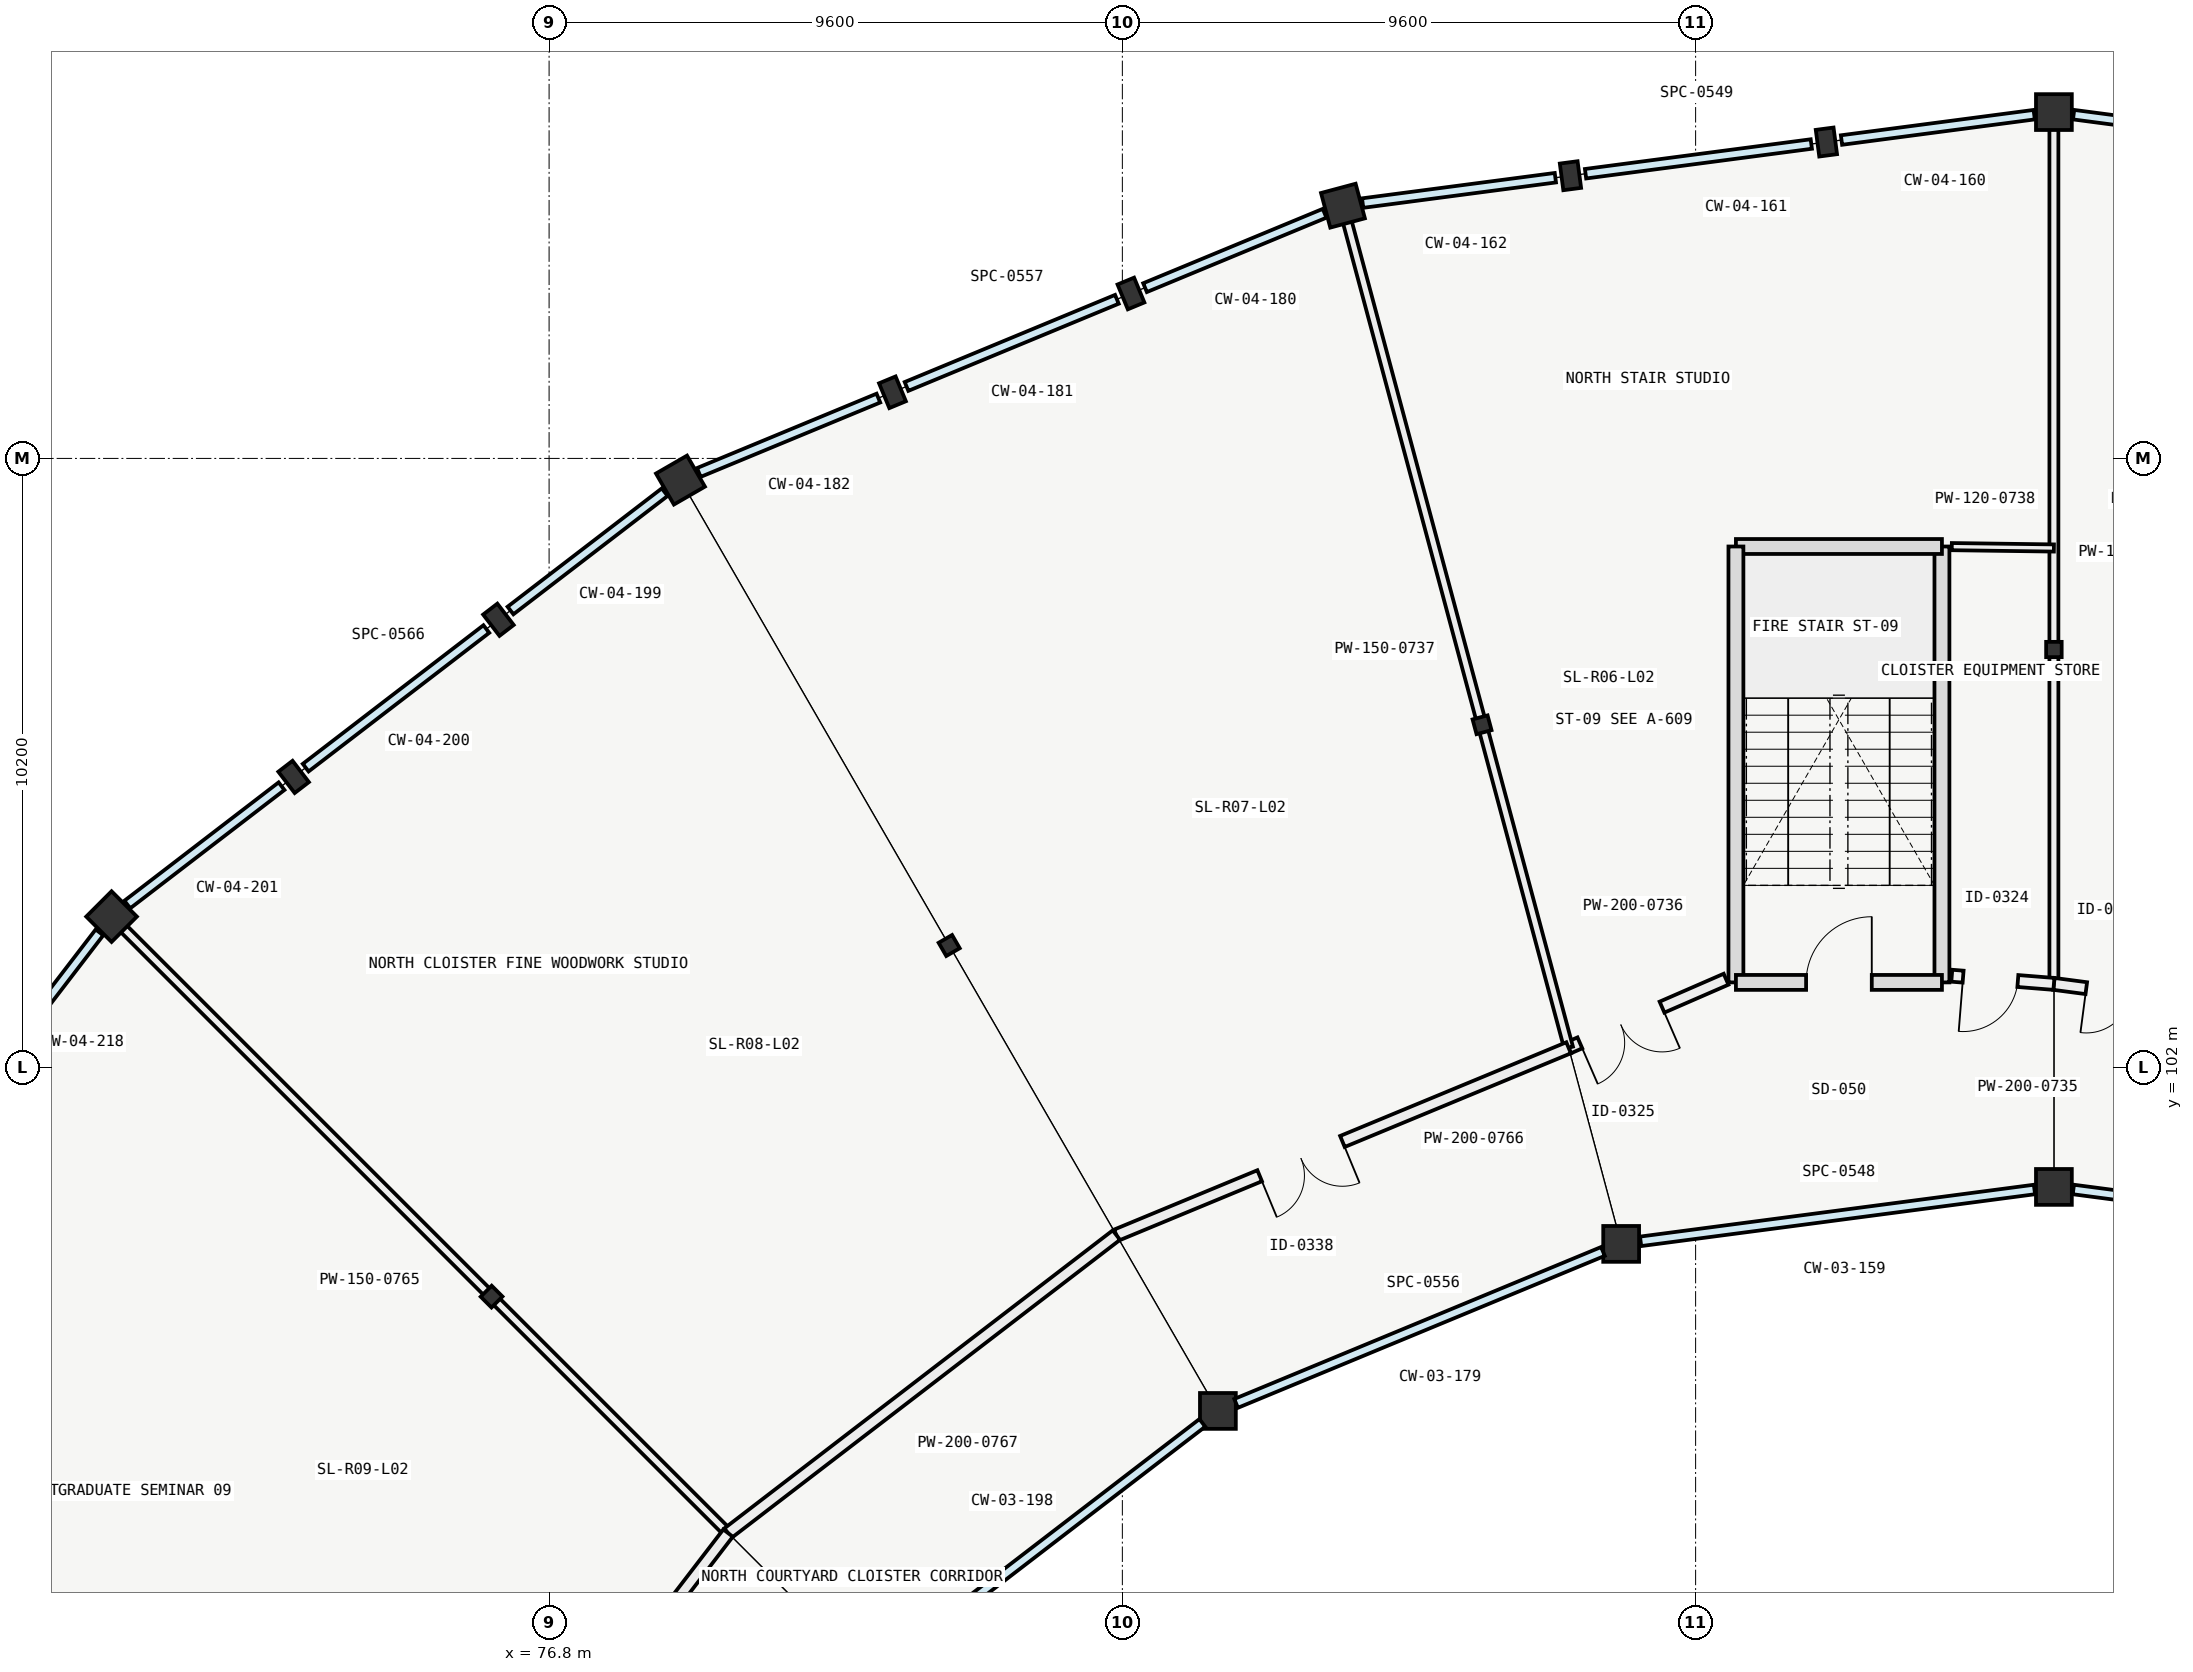
"""IFC4 building model, lengths in metres.
Left out: names, types, materials, properties, quantities, classifications, styles, units other than length and angle.
Written with IfcOpenShell. Run it as: python <this file> out.ifc"""

import sys

from ifc_helpers import new_model, si_unit, direction, frame, frame_2d, origin, origin_2d, place, context, subcontext, project, spatial, rectangle, circle, i_section, extrude, element, fill, save


model = new_model("IFC4")
c1 = context("Model", 3, precision=1e-05, world=origin(), true_north=direction((0.0, 1.0)))
c2 = subcontext(c1, "Body", "Model", "MODEL_VIEW")
j1 = project(units=[si_unit("LENGTHUNIT", "METRE"), si_unit("PLANEANGLEUNIT", "RADIAN")], contexts=[c1])
p1 = place(None, origin())
s1 = spatial("IfcSite", under=j1, at=p1, CompositionType="ELEMENT")
p2 = place(p1, origin())
s2 = spatial("IfcBuilding", under=s1, at=p2, CompositionType="ELEMENT")
p3 = place(p2, frame((0.0, 0.0, 9.6)))
s3 = spatial("IfcBuildingStorey", under=s2, at=p3, CompositionType="ELEMENT", Elevation=9.6)
p4 = place(p3, frame((102.0, 100.0, 0.0), z_axis=(0.0, 0.0, 1.0), x_axis=(0.0, 1.0, 0.0)))
e1 = element("IfcColumn", 1, at=p4, inside=s3, PredefinedType="COLUMN", context=c2, shape_type="SweptSolid", body=[
    extrude(circle(Radius=0.3, at=origin_2d()), origin(), (0.0, 0.0, 1.0), 4.2),
])
p5 = place(p3, frame((102.0, 109.0, 0.0), z_axis=(0.0, 0.0, 1.0), x_axis=(0.0, 1.0, 0.0)))
e2 = element("IfcColumn", 2, at=p5, inside=s3, PredefinedType="COLUMN", context=c2, shape_type="SweptSolid", body=[
    extrude(i_section(OverallWidth=0.256, OverallDepth=0.26, WebThickness=0.01, FlangeThickness=0.017, FilletRadius=0.014, at=origin_2d()), origin(), (0.0, 0.0, 1.0), 4.2),
])
p6 = place(p3, frame((102.0, 118.0, 0.0), z_axis=(0.0, 0.0, 1.0), x_axis=(0.0, 1.0, 0.0)))
e3 = element("IfcColumn", 3, at=p6, inside=s3, PredefinedType="COLUMN", context=c2, shape_type="SweptSolid", body=[
    extrude(rectangle(XDim=0.6, YDim=0.6, at=origin_2d()), origin(), (0.0, 0.0, 1.0), 4.2),
])
p7 = place(p3, frame((94.753, 99.046, 0.0), z_axis=(0.0, 0.0, 1.0), x_axis=(-0.258819045103, 0.965925826289, 0.0)))
e4 = element("IfcColumn", 4, at=p7, inside=s3, PredefinedType="COLUMN", context=c2, shape_type="SweptSolid", body=[
    extrude(circle(Radius=0.3, at=origin_2d()), origin(), (0.0, 0.0, 1.0), 4.2),
])
p8 = place(p3, frame((92.424, 107.739, 0.0), z_axis=(0.0, 0.0, 1.0), x_axis=(-0.258819045103, 0.965925826289, 0.0)))
e5 = element("IfcColumn", 5, at=p8, inside=s3, PredefinedType="COLUMN", context=c2, shape_type="SweptSolid", body=[
    extrude(i_section(OverallWidth=0.256, OverallDepth=0.26, WebThickness=0.01, FlangeThickness=0.017, FilletRadius=0.014, at=origin_2d()), origin(), (0.0, 0.0, 1.0), 4.2),
])
p9 = place(p3, frame((90.094, 116.433, 0.0), z_axis=(0.0, 0.0, 1.0), x_axis=(-0.258819045103, 0.965925826289, 0.0)))
e6 = element("IfcColumn", 6, at=p9, inside=s3, PredefinedType="COLUMN", context=c2, shape_type="SweptSolid", body=[
    extrude(rectangle(XDim=0.6, YDim=0.6, at=origin_2d()), origin(), (0.0, 0.0, 1.0), 4.2),
])
p10 = place(p3, frame((88.0, 96.249, 0.0), z_axis=(0.0, 0.0, 1.0), x_axis=(-0.5, 0.866025403784, 0.0)))
e7 = element("IfcColumn", 7, at=p10, inside=s3, PredefinedType="COLUMN", context=c2, shape_type="SweptSolid", body=[
    extrude(circle(Radius=0.3, at=origin_2d()), origin(), (0.0, 0.0, 1.0), 4.2),
])
p11 = place(p3, frame((83.5, 104.043, 0.0), z_axis=(0.0, 0.0, 1.0), x_axis=(-0.5, 0.866025403784, 0.0)))
e8 = element("IfcColumn", 8, at=p11, inside=s3, PredefinedType="COLUMN", context=c2, shape_type="SweptSolid", body=[
    extrude(i_section(OverallWidth=0.256, OverallDepth=0.26, WebThickness=0.01, FlangeThickness=0.017, FilletRadius=0.014, at=origin_2d()), origin(), (0.0, 0.0, 1.0), 4.2),
])
p12 = place(p3, frame((79.0, 111.837, 0.0), z_axis=(0.0, 0.0, 1.0), x_axis=(-0.5, 0.866025403784, 0.0)))
e9 = element("IfcColumn", 9, at=p12, inside=s3, PredefinedType="COLUMN", context=c2, shape_type="SweptSolid", body=[
    extrude(rectangle(XDim=0.6, YDim=0.6, at=origin_2d()), origin(), (0.0, 0.0, 1.0), 4.2),
])
p13 = place(p3, frame((75.837, 98.163, 0.0), z_axis=(0.0, 0.0, 1.0), x_axis=(-0.707106781187, 0.707106781187, 0.0)))
e10 = element("IfcColumn", 10, at=p13, inside=s3, PredefinedType="COLUMN", context=c2, shape_type="SweptSolid", body=[
    extrude(i_section(OverallWidth=0.256, OverallDepth=0.26, WebThickness=0.01, FlangeThickness=0.017, FilletRadius=0.014, at=origin_2d()), origin(), (0.0, 0.0, 1.0), 4.2),
])
p14 = place(p3, frame((69.473, 104.527, 0.0), z_axis=(0.0, 0.0, 1.0), x_axis=(-0.707106781187, 0.707106781187, 0.0)))
e11 = element("IfcColumn", 11, at=p14, inside=s3, PredefinedType="COLUMN", context=c2, shape_type="SweptSolid", body=[
    extrude(rectangle(XDim=0.6, YDim=0.6, at=origin_2d()), origin(), (0.0, 0.0, 1.0), 4.2),
])
for number, where, z_axis, x_axis in (
    (12, (98.19, 117.498, 0.0), (0.0, 0.0, 1.0), (0.991, 0.131, 0.0)),
    (13, (93.904, 116.934, 0.0), (0.0, 0.0, 1.0), (0.991, 0.131, 0.0)),
    (14, (86.544, 114.962, 0.0), (0.0, 0.0, 1.0), (0.924, 0.383, 0.0)),
    (15, (82.55, 113.308, 0.0), (0.0, 0.0, 1.0), (0.924, 0.383, 0.0)),
    (16, (75.951, 109.498, 0.0), (0.0, 0.0, 1.0), (0.793, 0.609, 0.0)),
    (17, (72.522, 106.866, 0.0), (0.0, 0.0, 1.0), (0.793, 0.609, 0.0)),
):
    element("IfcColumn", number, at=place(p3, frame(where, z_axis=z_axis, x_axis=x_axis)), inside=s3, PredefinedType="PILASTER", context=c2, shape_type="SweptSolid", body=[
        extrude(rectangle(XDim=0.3, YDim=0.45, at=origin_2d()), origin(), (0.0, 0.0, 1.0), 4.2),
    ])
p15 = place(p3, frame((100.125, 103.425, 0.0), z_axis=(0.0, 0.0, 1.0), x_axis=(0.0, 1.0, 0.0)))
e18 = element("IfcWall", 18, at=p15, inside=s3, PredefinedType="SOLIDWALL", context=c2, shape_type="SweptSolid", body=[
    extrude(rectangle(XDim=7.3, YDim=0.25, at=frame_2d((3.65, 0.0))), origin(), (0.0, 0.0, 1.0), 3.95),
])
p16 = place(p3, frame((100.125, 110.725, 0.0), z_axis=(0.0, 0.0, 1.0), x_axis=(-1.0, 0.0, 0.0)))
e19 = element("IfcWall", 19, at=p16, inside=s3, PredefinedType="SOLIDWALL", context=c2, shape_type="SweptSolid", body=[
    extrude(rectangle(XDim=3.45, YDim=0.25, at=frame_2d((1.725, 0.0))), origin(), (0.0, 0.0, 1.0), 3.95),
])
p17 = place(p3, frame((96.675, 110.725, 0.0), z_axis=(0.0, 0.0, 1.0), x_axis=(0.0, -1.0, 0.0)))
e20 = element("IfcWall", 20, at=p17, inside=s3, PredefinedType="SOLIDWALL", context=c2, shape_type="SweptSolid", body=[
    extrude(rectangle(XDim=7.3, YDim=0.25, at=frame_2d((3.65, 0.0))), origin(), (0.0, 0.0, 1.0), 3.95),
])
p18 = place(p3, frame((96.675, 103.425, 0.0), z_axis=(0.0, 0.0, 1.0), x_axis=(1.0, 0.0, 0.0)))
e21 = element("IfcWall", 21, at=p18, inside=s3, PredefinedType="SOLIDWALL", context=c2, shape_type="SweptSolid", body=[
    extrude(rectangle(XDim=3.45, YDim=0.25, at=frame_2d((1.725, 0.0))), origin(), (0.0, 0.0, 1.0), 3.95),
])
p19 = place(p18, frame((1.175, 0.0, 0.0)))
e22 = element("IfcOpeningElement", 22, at=p19, cuts=e21, PredefinedType="OPENING", context=c2, shape_type="SweptSolid", body=[
    extrude(rectangle(XDim=1.1, YDim=2.2, at=frame_2d((0.55, 1.1))), frame((0.0, 0.135, 0.0), z_axis=(0.0, -1.0, 0.0), x_axis=(1.0, 0.0, 0.0)), (0.0, 0.0, 1.0), 0.27),
])
p20 = place(p3, frame((102.0, 103.4, 0.0), z_axis=(0.0, 0.0, 1.0), x_axis=(0.0, 1.0, 0.0)))
e23 = element("IfcWall", 23, at=p20, inside=s3, PredefinedType="PARTITIONING", context=c2, shape_type="SweptSolid", body=[
    extrude(rectangle(XDim=14.48, YDim=0.15, at=frame_2d((7.24, 0.0))), origin(), (0.0, 0.0, 1.0), 3.397),
])
p21 = place(p3, frame((110.127, 102.33, 0.0), z_axis=(0.0, 0.0, 1.0), x_axis=(-0.991446589332, 0.130513066404, 0.0)))
e24 = element("IfcWall", 24, at=p21, inside=s3, PredefinedType="PARTITIONING", context=c2, shape_type="SweptSolid", body=[
    extrude(rectangle(XDim=8.197, YDim=0.2, at=frame_2d((4.099, 0.0))), origin(), (0.0, 0.0, 1.0), 3.402),
])
p22 = place(p21, frame((2.05, 0.0, 0.0)))
e25 = element("IfcOpeningElement", 25, at=p22, cuts=e24, PredefinedType="OPENING", context=c2, shape_type="SweptSolid", body=[
    extrude(rectangle(XDim=0.9, YDim=2.05, at=frame_2d((0.45, 1.025))), frame((0.0, 0.11, 0.0), z_axis=(0.0, -1.0, 0.0), x_axis=(1.0, 0.0, 0.0)), (0.0, 0.0, 1.0), 0.22),
])
p23 = place(p21, frame((6.15, 0.0, 0.0)))
e26 = element("IfcOpeningElement", 26, at=p23, cuts=e24, PredefinedType="OPENING", context=c2, shape_type="SweptSolid", body=[
    extrude(rectangle(XDim=1.5, YDim=2.2, at=frame_2d((0.75, 1.1))), frame((0.0, 0.11, 0.0), z_axis=(0.0, -1.0, 0.0), x_axis=(1.0, 0.0, 0.0)), (0.0, 0.0, 1.0), 0.22),
])
p24 = place(p3, frame((102.0, 103.4, 0.0), z_axis=(0.0, 0.0, 1.0), x_axis=(-0.996807580938, 0.07984138391, 0.0)))
e27 = element("IfcWall", 27, at=p24, inside=s3, PredefinedType="PARTITIONING", context=c2, shape_type="SweptSolid", body=[
    extrude(rectangle(XDim=1.715, YDim=0.2, at=frame_2d((0.858, 0.0))), origin(), (0.0, 0.0, 1.0), 3.402),
])
p25 = place(p24, frame((0.605, 0.0, 0.0)))
e28 = element("IfcOpeningElement", 28, at=p25, cuts=e27, PredefinedType="OPENING", context=c2, shape_type="SweptSolid", body=[
    extrude(rectangle(XDim=0.92, YDim=2.1, at=frame_2d((0.46, 1.05))), frame((0.0, 0.11, 0.0), z_axis=(0.0, -1.0, 0.0), x_axis=(1.0, 0.0, 0.0)), (0.0, 0.0, 1.0), 0.22),
])
p26 = place(p3, frame((96.51, 103.478, 0.0), z_axis=(0.0, 0.0, 1.0), x_axis=(-0.916855346374, -0.399219580964, 0.0)))
e29 = element("IfcWall", 29, at=p26, inside=s3, PredefinedType="PARTITIONING", context=c2, shape_type="SweptSolid", body=[
    extrude(rectangle(XDim=2.876, YDim=0.2, at=frame_2d((1.438, 0.0))), origin(), (0.0, 0.0, 1.0), 3.402),
])
p27 = place(p26, frame((1.17, 0.0, 0.0)))
e30 = element("IfcOpeningElement", 30, at=p27, cuts=e29, PredefinedType="OPENING", context=c2, shape_type="SweptSolid", body=[
    extrude(rectangle(XDim=1.5, YDim=2.2, at=frame_2d((0.75, 1.1))), frame((0.0, 0.11, 0.0), z_axis=(0.0, -1.0, 0.0), x_axis=(1.0, 0.0, 0.0)), (0.0, 0.0, 1.0), 0.22),
])
p28 = place(p3, frame((93.873, 102.33, 0.0), z_axis=(0.0, 0.0, 1.0), x_axis=(-0.258810530041, 0.965928107853, 0.0)))
e31 = element("IfcWall", 31, at=p28, inside=s3, PredefinedType="PARTITIONING", context=c2, shape_type="SweptSolid", body=[
    extrude(rectangle(XDim=14.48, YDim=0.15, at=frame_2d((7.24, 0.0))), origin(), (0.0, 0.0, 1.0), 3.397),
])
p29 = place(p3, frame((100.29, 110.723, 0.0), z_axis=(0.0, 0.0, 1.0), x_axis=(0.999909951855, -0.013419693814, 0.0)))
e32 = element("IfcWall", 32, at=p29, inside=s3, PredefinedType="PARTITIONING", context=c2, shape_type="SweptSolid", body=[
    extrude(rectangle(XDim=1.71, YDim=0.12, at=frame_2d((0.855, 0.0))), origin(), (0.0, 0.0, 1.0), 3.397),
])
p30 = place(p3, frame((79.797, 94.203, 0.0), z_axis=(0.0, 0.0, 1.0), x_axis=(-0.707106781187, 0.707106781187, 0.0)))
e33 = element("IfcWall", 33, at=p30, inside=s3, PredefinedType="PARTITIONING", context=c2, shape_type="SweptSolid", body=[
    extrude(rectangle(XDim=14.48, YDim=0.15, at=frame_2d((7.24, 0.0))), origin(), (0.0, 0.0, 1.0), 3.397),
])
p31 = place(p3, frame((93.873, 102.33, 0.0), z_axis=(0.0, 0.0, 1.0), x_axis=(-0.923874167149, -0.382696385238, 0.0)))
e34 = element("IfcWall", 34, at=p31, inside=s3, PredefinedType="PARTITIONING", context=c2, shape_type="SweptSolid", body=[
    extrude(rectangle(XDim=8.197, YDim=0.2, at=frame_2d((4.099, 0.0))), origin(), (0.0, 0.0, 1.0), 3.402),
])
p32 = place(p31, frame((4.1, 0.0, 0.0)))
e35 = element("IfcOpeningElement", 35, at=p32, cuts=e34, PredefinedType="OPENING", context=c2, shape_type="SweptSolid", body=[
    extrude(rectangle(XDim=1.5, YDim=2.2, at=frame_2d((0.75, 1.1))), frame((0.0, 0.11, 0.0), z_axis=(0.0, -1.0, 0.0), x_axis=(1.0, 0.0, 0.0)), (0.0, 0.0, 1.0), 0.22),
])
p33 = place(p3, frame((86.3, 99.193, 0.0), z_axis=(0.0, 0.0, 1.0), x_axis=(-0.793357497113, -0.608756011694, 0.0)))
e36 = element("IfcWall", 36, at=p33, inside=s3, PredefinedType="PARTITIONING", context=c2, shape_type="SweptSolid", body=[
    extrude(rectangle(XDim=8.197, YDim=0.2, at=frame_2d((4.099, 0.0))), origin(), (0.0, 0.0, 1.0), 3.402),
])
p34 = place(p3, frame((74.807, 87.7, 0.0), z_axis=(0.0, 0.0, 1.0), x_axis=(-0.866025544155, 0.499999756871, 0.0)))
e37 = element("IfcWall", 37, at=p34, inside=s3, PredefinedType="PARTITIONING", context=c2, shape_type="SweptSolid", body=[
    extrude(rectangle(XDim=14.48, YDim=0.15, at=frame_2d((7.24, 0.0))), origin(), (0.0, 0.0, 1.0), 3.397),
])
p35 = place(p3, frame((79.797, 94.203, 0.0), z_axis=(0.0, 0.0, 1.0), x_axis=(-0.608756011694, -0.793357497113, 0.0)))
e38 = element("IfcWall", 38, at=p35, inside=s3, PredefinedType="PARTITIONING", context=c2, shape_type="SweptSolid", body=[
    extrude(rectangle(XDim=8.197, YDim=0.2, at=frame_2d((4.099, 0.0))), origin(), (0.0, 0.0, 1.0), 3.402),
])
p36 = place(p35, frame((4.1, 0.0, 0.0)))
e39 = element("IfcOpeningElement", 39, at=p36, cuts=e38, PredefinedType="OPENING", context=c2, shape_type="SweptSolid", body=[
    extrude(rectangle(XDim=0.92, YDim=2.1, at=frame_2d((0.46, 1.05))), frame((0.0, 0.11, 0.0), z_axis=(0.0, -1.0, 0.0), x_axis=(1.0, 0.0, 0.0)), (0.0, 0.0, 1.0), 0.22),
])
p37 = place(p19, origin())
e40 = element("IfcDoor", 40, at=p37, inside=s3, OperationType="SINGLE_SWING_RIGHT", PredefinedType="DOOR", context=c2, shape_type="SweptSolid", body=[
    extrude(rectangle(XDim=1.1, YDim=2.2, at=frame_2d((0.55, 1.1))), frame((0.0, 0.025, 0.0), z_axis=(0.0, -1.0, 0.0), x_axis=(1.0, 0.0, 0.0)), (0.0, 0.0, 1.0), 0.05),
])
fill(e22, e40)
p38 = place(p23, origin())
e41 = element("IfcDoor", 41, at=p38, inside=s3, OperationType="DOUBLE_DOOR_SINGLE_SWING", PredefinedType="DOOR", context=c2, shape_type="SweptSolid", body=[
    extrude(rectangle(XDim=1.5, YDim=2.2, at=frame_2d((0.75, 1.1))), frame((0.0, 0.025, 0.0), z_axis=(0.0, -1.0, 0.0), x_axis=(1.0, 0.0, 0.0)), (0.0, 0.0, 1.0), 0.05),
])
fill(e26, e41)
p39 = place(p25, origin())
e42 = element("IfcDoor", 42, at=p39, inside=s3, OperationType="SINGLE_SWING_RIGHT", PredefinedType="DOOR", context=c2, shape_type="SweptSolid", body=[
    extrude(rectangle(XDim=0.92, YDim=2.1, at=frame_2d((0.46, 1.05))), frame((0.0, 0.025, 0.0), z_axis=(0.0, -1.0, 0.0), x_axis=(1.0, 0.0, 0.0)), (0.0, 0.0, 1.0), 0.05),
])
fill(e28, e42)
p40 = place(p27, origin())
e43 = element("IfcDoor", 43, at=p40, inside=s3, OperationType="DOUBLE_DOOR_SINGLE_SWING", PredefinedType="DOOR", context=c2, shape_type="SweptSolid", body=[
    extrude(rectangle(XDim=1.5, YDim=2.2, at=frame_2d((0.75, 1.1))), frame((0.0, 0.025, 0.0), z_axis=(0.0, -1.0, 0.0), x_axis=(1.0, 0.0, 0.0)), (0.0, 0.0, 1.0), 0.05),
])
fill(e30, e43)
p41 = place(p32, origin())
e44 = element("IfcDoor", 44, at=p41, inside=s3, OperationType="DOUBLE_DOOR_SINGLE_SWING", PredefinedType="DOOR", context=c2, shape_type="SweptSolid", body=[
    extrude(rectangle(XDim=1.5, YDim=2.2, at=frame_2d((0.75, 1.1))), frame((0.0, 0.025, 0.0), z_axis=(0.0, -1.0, 0.0), x_axis=(1.0, 0.0, 0.0)), (0.0, 0.0, 1.0), 0.05),
])
fill(e35, e44)
save(model, sys.argv[1])
